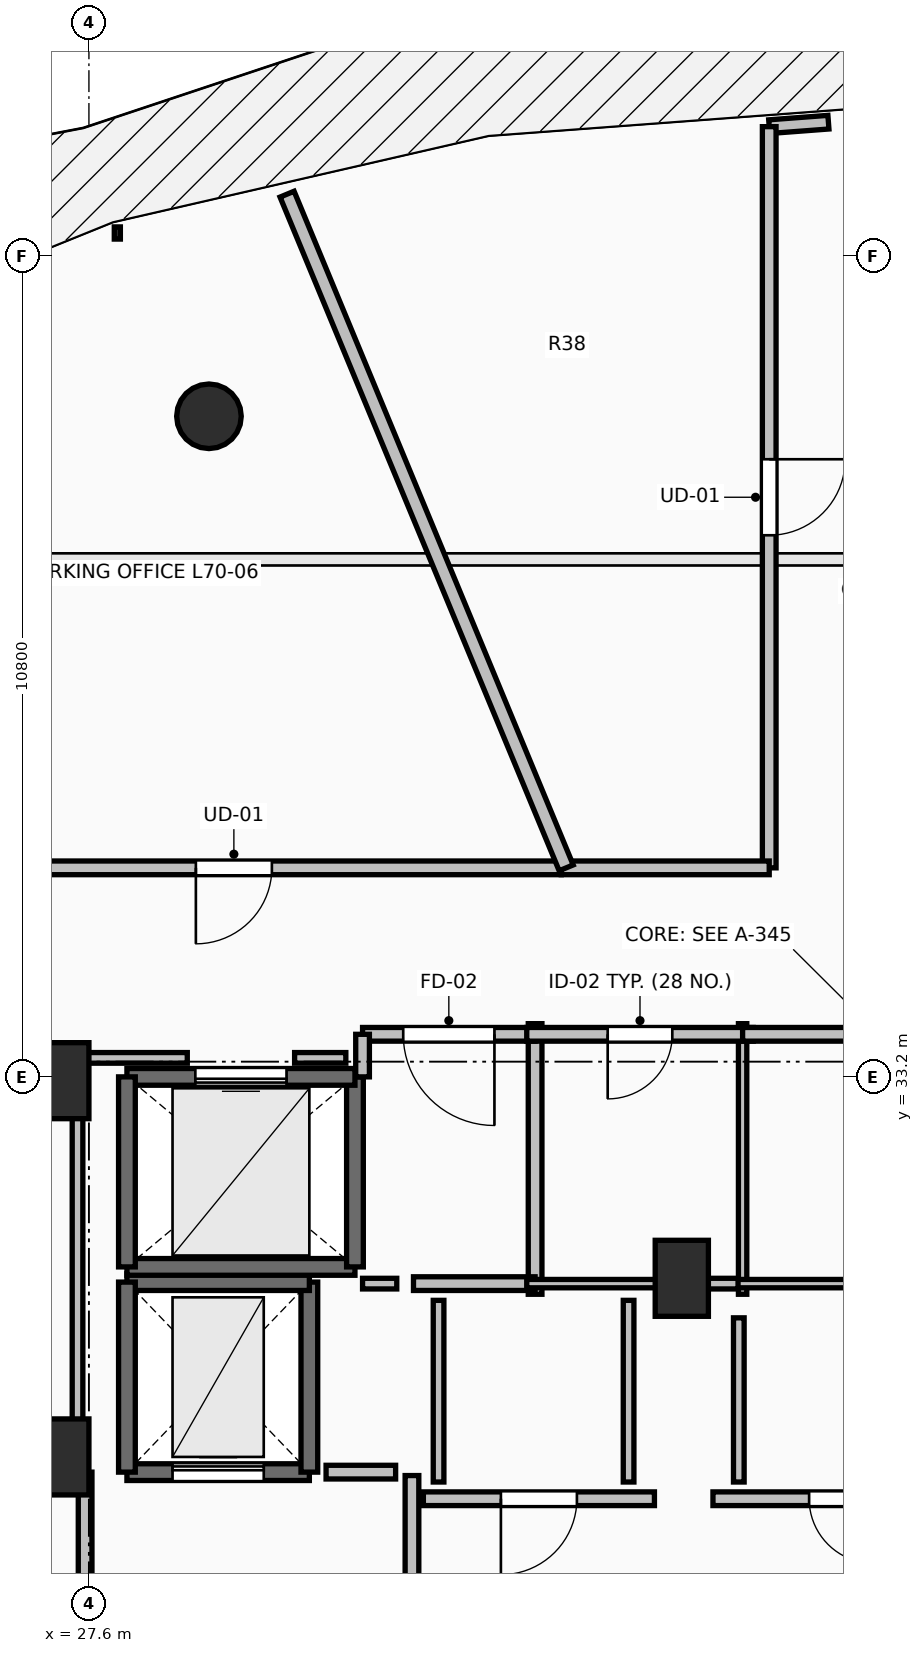
"""IFC4 building model, lengths in metres.
Left out: names, types, materials, properties, quantities, classifications, styles, units other than length and angle.
Written with IfcOpenShell. Run it as: python <this file> out.ifc"""

import sys

from ifc_helpers import new_model, si_unit, direction, frame, frame_2d, origin, origin_2d, place, context, subcontext, project, spatial, rectangle, circle, extrude, element, fill, save


model = new_model("IFC4")
c1 = context("Model", 3, precision=1e-05, world=origin(), true_north=direction((0.0, 1.0)))
c2 = subcontext(c1, "Body", "Model", "MODEL_VIEW")
j1 = project(units=[si_unit("LENGTHUNIT", "METRE"), si_unit("PLANEANGLEUNIT", "RADIAN")], contexts=[c1])
p1 = place(None, origin())
s1 = spatial("IfcSite", under=j1, at=p1, CompositionType="ELEMENT")
p2 = place(p1, origin())
s2 = spatial("IfcBuilding", under=s1, at=p2, CompositionType="ELEMENT")
p3 = place(p2, frame((0.0, 0.0, 259.1)))
s3 = spatial("IfcBuildingStorey", under=s2, at=p3, CompositionType="ELEMENT", Elevation=259.1)
p4 = place(p3, frame((29.179, 41.891, 0.0), z_axis=(0.0, 0.0, 1.0), x_axis=(-0.382683432365, 0.923879532511, 0.0)))
e1 = element("IfcColumn", 1, at=p4, inside=s3, PredefinedType="COLUMN", context=c2, shape_type="SweptSolid", body=[
    extrude(circle(Radius=0.425, at=origin_2d()), origin(), (0.0, 0.0, 1.0), 3.55),
])
for number, where, z_axis, x_axis in (
    (2, (27.25, 28.2, 0.0), (0.0, 0.0, 1.0), (1.0, 0.0, 0.0)),
    (3, (27.25, 33.15, 0.0), (0.0, 0.0, 1.0), (1.0, 0.0, 0.0)),
    (4, (35.4, 30.55, 0.0), (0.0, 0.0, 1.0), (1.0, 0.0, 0.0)),
):
    element("IfcColumn", number, at=place(p3, frame(where, z_axis=z_axis, x_axis=x_axis)), inside=s3, PredefinedType="PILASTER", context=c2, shape_type="SweptSolid", body=[
        extrude(rectangle(XDim=0.7, YDim=1.0, at=origin_2d()), origin(), (0.0, 0.0, 1.0), 3.55),
    ])
p5 = place(p3, frame((28.1, 28.0, 0.0), z_axis=(0.0, 0.0, 1.0), x_axis=(1.0, 0.0, 0.0)))
e5 = element("IfcWall", 5, at=p5, inside=s3, PredefinedType="SHEAR", context=c2, shape_type="SweptSolid", body=[
    extrude(rectangle(XDim=2.4, YDim=0.22, at=frame_2d((1.2, 0.0))), origin(), (0.0, 0.0, 1.0), 3.29),
])
p6 = place(p5, frame((0.6, 0.0, 0.0)))
e6 = element("IfcOpeningElement", 6, at=p6, cuts=e5, PredefinedType="OPENING", context=c2, shape_type="SweptSolid", body=[
    extrude(rectangle(XDim=1.2, YDim=2.2, at=frame_2d((0.6, 1.1))), frame((0.0, 0.125, 0.0), z_axis=(0.0, -1.0, 0.0), x_axis=(1.0, 0.0, 0.0)), (0.0, 0.0, 1.0), 0.25),
])
p7 = place(p3, frame((30.5, 28.0, 0.0), z_axis=(0.0, 0.0, 1.0), x_axis=(0.0, 1.0, 0.0)))
e7 = element("IfcWall", 7, at=p7, inside=s3, PredefinedType="SHEAR", context=c2, shape_type="SweptSolid", body=[
    extrude(rectangle(XDim=2.5, YDim=0.22, at=frame_2d((1.25, 0.0))), origin(), (0.0, 0.0, 1.0), 3.29),
])
p8 = place(p3, frame((30.5, 30.5, 0.0), z_axis=(0.0, 0.0, 1.0), x_axis=(-1.0, 0.0, 0.0)))
e8 = element("IfcWall", 8, at=p8, inside=s3, PredefinedType="SHEAR", context=c2, shape_type="SweptSolid", body=[
    extrude(rectangle(XDim=2.4, YDim=0.22, at=frame_2d((1.2, 0.0))), origin(), (0.0, 0.0, 1.0), 3.29),
])
p9 = place(p3, frame((28.1, 30.5, 0.0), z_axis=(0.0, 0.0, 1.0), x_axis=(0.0, -1.0, 0.0)))
e9 = element("IfcWall", 9, at=p9, inside=s3, PredefinedType="SHEAR", context=c2, shape_type="SweptSolid", body=[
    extrude(rectangle(XDim=2.5, YDim=0.22, at=frame_2d((1.25, 0.0))), origin(), (0.0, 0.0, 1.0), 3.29),
])
p10 = place(p3, frame((28.1, 30.7, 0.0), z_axis=(0.0, 0.0, 1.0), x_axis=(1.0, 0.0, 0.0)))
e10 = element("IfcWall", 10, at=p10, inside=s3, PredefinedType="SOLIDWALL", context=c2, shape_type="SweptSolid", body=[
    extrude(rectangle(XDim=3.0, YDim=0.22, at=frame_2d((1.5, 0.0))), origin(), (0.0, 0.0, 1.0), 3.29),
])
p11 = place(p3, frame((31.1, 30.7, 0.0), z_axis=(0.0, 0.0, 1.0), x_axis=(0.0, 1.0, 0.0)))
e11 = element("IfcWall", 11, at=p11, inside=s3, PredefinedType="SOLIDWALL", context=c2, shape_type="SweptSolid", body=[
    extrude(rectangle(XDim=2.5, YDim=0.22, at=frame_2d((1.25, 0.0))), origin(), (0.0, 0.0, 1.0), 3.29),
])
p12 = place(p3, frame((31.1, 33.2, 0.0), z_axis=(0.0, 0.0, 1.0), x_axis=(-1.0, 0.0, 0.0)))
e12 = element("IfcWall", 12, at=p12, inside=s3, PredefinedType="SOLIDWALL", context=c2, shape_type="SweptSolid", body=[
    extrude(rectangle(XDim=3.0, YDim=0.22, at=frame_2d((1.5, 0.0))), origin(), (0.0, 0.0, 1.0), 3.29),
])
p13 = place(p12, frame((0.9, 0.0, 0.0)))
e13 = element("IfcOpeningElement", 13, at=p13, cuts=e12, PredefinedType="OPENING", context=c2, shape_type="SweptSolid", body=[
    extrude(rectangle(XDim=1.2, YDim=2.2, at=frame_2d((0.6, 1.1))), frame((0.0, 0.125, 0.0), z_axis=(0.0, -1.0, 0.0), x_axis=(1.0, 0.0, 0.0)), (0.0, 0.0, 1.0), 0.25),
])
p14 = place(p3, frame((28.1, 33.2, 0.0), z_axis=(0.0, 0.0, 1.0), x_axis=(0.0, -1.0, 0.0)))
e14 = element("IfcWall", 14, at=p14, inside=s3, PredefinedType="SOLIDWALL", context=c2, shape_type="SweptSolid", body=[
    extrude(rectangle(XDim=2.5, YDim=0.22, at=frame_2d((1.25, 0.0))), origin(), (0.0, 0.0, 1.0), 3.29),
])
p15 = place(p3, frame((31.85, 24.045, 0.0), z_axis=(0.0, 0.0, 1.0), x_axis=(0.0, 1.0, 0.0)))
e15 = element("IfcWall", 15, at=p15, inside=s3, PredefinedType="PARTITIONING", context=c2, shape_type="SweptSolid", body=[
    extrude(rectangle(XDim=3.91, YDim=0.18, at=frame_2d((1.955, 0.0))), origin(), (0.0, 0.0, 1.0), 3.29),
])
p16 = place(p15, frame((1.355, 0.0, 0.0)))
e16 = element("IfcOpeningElement", 16, at=p16, cuts=e15, PredefinedType="OPENING", context=c2, shape_type="SweptSolid", body=[
    extrude(rectangle(XDim=1.2, YDim=2.15, at=frame_2d((0.6, 1.075))), frame((0.0, 0.105, 0.0), z_axis=(0.0, -1.0, 0.0), x_axis=(1.0, 0.0, 0.0)), (0.0, 0.0, 1.0), 0.21),
])
p17 = place(p3, frame((27.55, 28.0, 0.0), z_axis=(0.0, 0.0, 1.0), x_axis=(0.0, -1.0, 0.0)))
e17 = element("IfcWall", 17, at=p17, inside=s3, PredefinedType="PARTITIONING", context=c2, shape_type="SweptSolid", body=[
    extrude(rectangle(XDim=4.05, YDim=0.18, at=frame_2d((2.025, 0.0))), origin(), (0.0, 0.0, 1.0), 3.29),
])
p18 = place(p17, frame((1.425, 0.0, 0.0)))
e18 = element("IfcOpeningElement", 18, at=p18, cuts=e17, PredefinedType="OPENING", context=c2, shape_type="SweptSolid", body=[
    extrude(rectangle(XDim=1.2, YDim=2.15, at=frame_2d((0.6, 1.075))), frame((0.0, 0.105, 0.0), z_axis=(0.0, -1.0, 0.0), x_axis=(1.0, 0.0, 0.0)), (0.0, 0.0, 1.0), 0.21),
])
p19 = place(p3, frame((33.47, 30.34, 0.0), z_axis=(0.0, 0.0, 1.0), x_axis=(0.0, 1.0, 0.0)))
e19 = element("IfcWall", 19, at=p19, inside=s3, PredefinedType="PARTITIONING", context=c2, shape_type="SweptSolid", body=[
    extrude(rectangle(XDim=3.56, YDim=0.18, at=frame_2d((1.78, 0.0))), origin(), (0.0, 0.0, 1.0), 3.29),
])
p20 = place(p3, frame((31.87, 30.48, 0.0), z_axis=(0.0, 0.0, 1.0), x_axis=(1.0, 0.0, 0.0)))
e20 = element("IfcWall", 20, at=p20, inside=s3, PredefinedType="PARTITIONING", context=c2, shape_type="SweptSolid", body=[
    extrude(rectangle(XDim=1.6, YDim=0.18, at=frame_2d((0.8, 0.0))), origin(), (0.0, 0.0, 1.0), 3.29),
])
p21 = place(p3, frame((33.47, 33.76, 0.0), z_axis=(0.0, 0.0, 1.0), x_axis=(-1.0, 0.0, 0.0)))
e21 = element("IfcWall", 21, at=p21, inside=s3, PredefinedType="PARTITIONING", context=c2, shape_type="SweptSolid", body=[
    extrude(rectangle(XDim=2.27, YDim=0.18, at=frame_2d((1.135, 0.0))), origin(), (0.0, 0.0, 1.0), 3.29),
])
p22 = place(p21, frame((0.535, 0.0, 0.0)))
e22 = element("IfcOpeningElement", 22, at=p22, cuts=e21, PredefinedType="OPENING", context=c2, shape_type="SweptSolid", body=[
    extrude(rectangle(XDim=1.2, YDim=2.15, at=frame_2d((0.6, 1.075))), frame((0.0, 0.105, 0.0), z_axis=(0.0, -1.0, 0.0), x_axis=(1.0, 0.0, 0.0)), (0.0, 0.0, 1.0), 0.21),
])
p23 = place(p3, frame((31.2, 33.76, 0.0), z_axis=(0.0, 0.0, 1.0), x_axis=(0.0, -1.0, 0.0)))
e23 = element("IfcWall", 23, at=p23, inside=s3, PredefinedType="PARTITIONING", context=c2, shape_type="SweptSolid", body=[
    extrude(rectangle(XDim=0.56, YDim=0.18, at=frame_2d((0.28, 0.0))), origin(), (0.0, 0.0, 1.0), 3.29),
])
p24 = place(p3, frame((35.04, 27.65, 0.0), z_axis=(0.0, 0.0, 1.0), x_axis=(-1.0, 0.0, 0.0)))
e24 = element("IfcWall", 24, at=p24, inside=s3, PredefinedType="PARTITIONING", context=c2, shape_type="SweptSolid", body=[
    extrude(rectangle(XDim=3.04, YDim=0.18, at=frame_2d((1.52, 0.0))), origin(), (0.0, 0.0, 1.0), 3.29),
])
p25 = place(p24, frame((1.02, 0.0, 0.0)))
e25 = element("IfcOpeningElement", 25, at=p25, cuts=e24, PredefinedType="OPENING", context=c2, shape_type="SweptSolid", body=[
    extrude(rectangle(XDim=1.0, YDim=2.15, at=frame_2d((0.5, 1.075))), frame((0.0, 0.105, 0.0), z_axis=(0.0, -1.0, 0.0), x_axis=(1.0, 0.0, 0.0)), (0.0, 0.0, 1.0), 0.21),
])
p26 = place(p3, frame((39.19, 27.65, 0.0), z_axis=(0.0, 0.0, 1.0), x_axis=(-1.0, 0.0, 0.0)))
e26 = element("IfcWall", 26, at=p26, inside=s3, PredefinedType="PARTITIONING", context=c2, shape_type="SweptSolid", body=[
    extrude(rectangle(XDim=3.38, YDim=0.18, at=frame_2d((1.69, 0.0))), origin(), (0.0, 0.0, 1.0), 3.29),
])
p27 = place(p26, frame((1.265, 0.0, 0.0)))
e27 = element("IfcOpeningElement", 27, at=p27, cuts=e26, PredefinedType="OPENING", context=c2, shape_type="SweptSolid", body=[
    extrude(rectangle(XDim=0.85, YDim=2.1, at=frame_2d((0.425, 1.05))), frame((0.0, 0.105, 0.0), z_axis=(0.0, -1.0, 0.0), x_axis=(1.0, 0.0, 0.0)), (0.0, 0.0, 1.0), 0.21),
])
p28 = place(p3, frame((36.2, 30.34, 0.0), z_axis=(0.0, 0.0, 1.0), x_axis=(0.0, 1.0, 0.0)))
e28 = element("IfcWall", 28, at=p28, inside=s3, PredefinedType="PARTITIONING", context=c2, shape_type="SweptSolid", body=[
    extrude(rectangle(XDim=3.56, YDim=0.11, at=frame_2d((1.78, 0.0))), origin(), (0.0, 0.0, 1.0), 2.482),
])
p29 = place(p3, frame((33.36, 30.48, 0.0), z_axis=(0.0, 0.0, 1.0), x_axis=(1.0, 0.0, 0.0)))
e29 = element("IfcWall", 29, at=p29, inside=s3, PredefinedType="PARTITIONING", context=c2, shape_type="SweptSolid", body=[
    extrude(rectangle(XDim=1.81, YDim=0.11, at=frame_2d((0.905, 0.0))), origin(), (0.0, 0.0, 1.0), 3.29),
])
p30 = place(p3, frame((36.34, 33.76, 0.0), z_axis=(0.0, 0.0, 1.0), x_axis=(-1.0, 0.0, 0.0)))
e30 = element("IfcWall", 30, at=p30, inside=s3, PredefinedType="PARTITIONING", context=c2, shape_type="SweptSolid", body=[
    extrude(rectangle(XDim=2.98, YDim=0.18, at=frame_2d((1.49, 0.0))), origin(), (0.0, 0.0, 1.0), 3.29),
])
p31 = place(p30, frame((1.065, 0.0, 0.0)))
e31 = element("IfcOpeningElement", 31, at=p31, cuts=e30, PredefinedType="OPENING", context=c2, shape_type="SweptSolid", body=[
    extrude(rectangle(XDim=0.85, YDim=2.1, at=frame_2d((0.425, 1.05))), frame((0.0, 0.105, 0.0), z_axis=(0.0, -1.0, 0.0), x_axis=(1.0, 0.0, 0.0)), (0.0, 0.0, 1.0), 0.21),
])
p32 = place(p3, frame((36.11, 30.48, 0.0), z_axis=(0.0, 0.0, 1.0), x_axis=(1.0, 0.0, 0.0)))
e32 = element("IfcWall", 32, at=p32, inside=s3, PredefinedType="PARTITIONING", context=c2, shape_type="SweptSolid", body=[
    extrude(rectangle(XDim=3.21, YDim=0.11, at=frame_2d((1.605, 0.0))), origin(), (0.0, 0.0, 1.0), 2.482),
])
p33 = place(p3, frame((41.04, 33.76, 0.0), z_axis=(0.0, 0.0, 1.0), x_axis=(-1.0, 0.0, 0.0)))
e33 = element("IfcWall", 33, at=p33, inside=s3, PredefinedType="PARTITIONING", context=c2, shape_type="SweptSolid", body=[
    extrude(rectangle(XDim=4.84, YDim=0.18, at=frame_2d((2.42, 0.0))), origin(), (0.0, 0.0, 1.0), 3.29),
])
p34 = place(p33, frame((1.995, 0.0, 0.0)))
e34 = element("IfcOpeningElement", 34, at=p34, cuts=e33, PredefinedType="OPENING", context=c2, shape_type="SweptSolid", body=[
    extrude(rectangle(XDim=0.85, YDim=2.1, at=frame_2d((0.425, 1.05))), frame((0.0, 0.105, 0.0), z_axis=(0.0, -1.0, 0.0), x_axis=(1.0, 0.0, 0.0)), (0.0, 0.0, 1.0), 0.21),
])
p35 = place(p3, frame((37.329, 45.76, 0.0), z_axis=(0.0, 0.0, 1.0), x_axis=(-0.997136622012, -0.0756211415, 0.0)))
e35 = element("IfcWall", 35, at=p35, inside=s3, PredefinedType="PARTITIONING", context=c2, shape_type="SweptSolid", body=[
    extrude(rectangle(XDim=0.781, YDim=0.18, at=frame_2d((0.391, 0.0))), origin(), (0.0, 0.0, 1.0), 3.29),
])
p36 = place(p3, frame((36.55, 45.701, 0.0), z_axis=(0.0, 0.0, 1.0), x_axis=(0.0, -1.0, 0.0)))
e36 = element("IfcWall", 36, at=p36, inside=s3, PredefinedType="PARTITIONING", context=c2, shape_type="SweptSolid", body=[
    extrude(rectangle(XDim=9.751, YDim=0.18, at=frame_2d((4.875, 0.0))), origin(), (0.0, 0.0, 1.0), 2.482),
])
p37 = place(p36, frame((4.375, 0.0, 0.0)))
e37 = element("IfcOpeningElement", 37, at=p37, cuts=e36, PredefinedType="OPENING", context=c2, shape_type="SweptSolid", body=[
    extrude(rectangle(XDim=1.0, YDim=2.15, at=frame_2d((0.5, 1.075))), frame((0.0, 0.105, 0.0), z_axis=(0.0, -1.0, 0.0), x_axis=(1.0, 0.0, 0.0)), (0.0, 0.0, 1.0), 0.21),
])
p38 = place(p3, frame((36.55, 35.95, 0.0), z_axis=(0.0, 0.0, 1.0), x_axis=(-1.0, 0.0, 0.0)))
e38 = element("IfcWall", 38, at=p38, inside=s3, PredefinedType="PARTITIONING", context=c2, shape_type="SweptSolid", body=[
    extrude(rectangle(XDim=2.736, YDim=0.18, at=frame_2d((1.368, 0.0))), origin(), (0.0, 0.0, 1.0), 3.29),
])
p39 = place(p3, frame((33.814, 35.95, 0.0), z_axis=(0.0, 0.0, 1.0), x_axis=(-1.0, 0.0, 0.0)))
e39 = element("IfcWall", 39, at=p39, inside=s3, PredefinedType="PARTITIONING", context=c2, shape_type="SweptSolid", body=[
    extrude(rectangle(XDim=8.614, YDim=0.18, at=frame_2d((4.307, 0.0))), origin(), (0.0, 0.0, 1.0), 2.482),
])
p40 = place(p39, frame((3.807, 0.0, 0.0)))
e40 = element("IfcOpeningElement", 40, at=p40, cuts=e39, PredefinedType="OPENING", context=c2, shape_type="SweptSolid", body=[
    extrude(rectangle(XDim=1.0, YDim=2.15, at=frame_2d((0.5, 1.075))), frame((0.0, 0.105, 0.0), z_axis=(0.0, -1.0, 0.0), x_axis=(1.0, 0.0, 0.0)), (0.0, 0.0, 1.0), 0.21),
])
p41 = place(p3, frame((30.207, 44.813, 0.0), z_axis=(0.0, 0.0, 1.0), x_axis=(0.38274436158, -0.92385429245, 0.0)))
e41 = element("IfcWall", 41, at=p41, inside=s3, PredefinedType="PARTITIONING", context=c2, shape_type="SweptSolid", body=[
    extrude(rectangle(XDim=9.594, YDim=0.2, at=frame_2d((4.797, 0.0))), origin(), (0.0, 0.0, 1.0), 2.482),
])
p42 = place(p3, frame((31.635, 28.0, 0.0), z_axis=(0.0, 0.0, 1.0), x_axis=(-1.0, 0.0, 0.0)))
e42 = element("IfcWall", 42, at=p42, inside=s3, PredefinedType="PARTITIONING", context=c2, shape_type="SweptSolid", body=[
    extrude(rectangle(XDim=0.915, YDim=0.18, at=frame_2d((0.458, 0.0))), origin(), (0.0, 0.0, 1.0), 3.29),
])
p43 = place(p3, frame((31.2, 30.48, 0.0), z_axis=(0.0, 0.0, 1.0), x_axis=(1.0, 0.0, 0.0)))
e43 = element("IfcWall", 43, at=p43, inside=s3, PredefinedType="PARTITIONING", context=c2, shape_type="SweptSolid", body=[
    extrude(rectangle(XDim=0.45, YDim=0.14, at=frame_2d((0.225, 0.0))), origin(), (0.0, 0.0, 1.0), 3.29),
])
p44 = place(p3, frame((35.14, 30.48, 0.0), z_axis=(0.0, 0.0, 1.0), x_axis=(1.0, 0.0, 0.0)))
e44 = element("IfcWall", 44, at=p44, inside=s3, PredefinedType="PARTITIONING", context=c2, shape_type="SweptSolid", body=[
    extrude(rectangle(XDim=1.0, YDim=0.14, at=frame_2d((0.5, 0.0))), origin(), (0.0, 0.0, 1.0), 2.482),
])
for number, where, z_axis, x_axis in (
    (45, (32.2, 30.26, 0.0), (0.0, 0.0, 1.0), (0.0, -1.0, 0.0)),
    (46, (34.7, 27.87, 0.0), (0.0, 0.0, 1.0), (0.0, 1.0, 0.0)),
):
    element("IfcWall", number, at=place(p3, frame(where, z_axis=z_axis, x_axis=x_axis)), inside=s3, PredefinedType="PARTITIONING", context=c2, shape_type="SweptSolid", body=[
        extrude(rectangle(XDim=2.39, YDim=0.14, at=frame_2d((1.195, 0.0))), origin(), (0.0, 0.0, 1.0), 3.29),
    ])
p45 = place(p3, frame((36.15, 30.03, 0.0), z_axis=(0.0, 0.0, 1.0), x_axis=(0.0, -1.0, 0.0)))
e47 = element("IfcWall", 47, at=p45, inside=s3, PredefinedType="PARTITIONING", context=c2, shape_type="SweptSolid", body=[
    extrude(rectangle(XDim=2.16, YDim=0.14, at=frame_2d((1.08, 0.0))), origin(), (0.0, 0.0, 1.0), 3.29),
])
p46 = place(p3, frame((30.98, 33.45, 0.0), z_axis=(0.0, 0.0, 1.0), x_axis=(-1.0, 0.0, 0.0)))
e48 = element("IfcWall", 48, at=p46, inside=s3, PredefinedType="PARTITIONING", context=c2, shape_type="SweptSolid", body=[
    extrude(rectangle(XDim=0.674, YDim=0.14, at=frame_2d((0.337, 0.0))), origin(), (0.0, 0.0, 1.0), 3.29),
])
p47 = place(p3, frame((28.894, 33.45, 0.0), z_axis=(0.0, 0.0, 1.0), x_axis=(-1.0, 0.0, 0.0)))
e49 = element("IfcWall", 49, at=p47, inside=s3, PredefinedType="PARTITIONING", context=c2, shape_type="SweptSolid", body=[
    extrude(rectangle(XDim=1.444, YDim=0.14, at=frame_2d((0.722, 0.0))), origin(), (0.0, 0.0, 1.0), 2.482),
])
p48 = place(p3, frame((27.45, 33.45, 0.0), z_axis=(0.0, 0.0, 1.0), x_axis=(0.0, -1.0, 0.0)))
e50 = element("IfcWall", 50, at=p48, inside=s3, PredefinedType="PARTITIONING", context=c2, shape_type="SweptSolid", body=[
    extrude(rectangle(XDim=5.254, YDim=0.14, at=frame_2d((2.627, 0.0))), origin(), (0.0, 0.0, 1.0), 2.482),
])
p49 = place(p6, origin())
e51 = element("IfcDoor", 51, at=p49, inside=s3, OperationType="SLIDING_TO_LEFT", PredefinedType="DOOR", context=c2, shape_type="SweptSolid", body=[
    extrude(rectangle(XDim=1.2, YDim=2.2, at=frame_2d((0.6, 1.1))), frame((0.0, 0.025, 0.0), z_axis=(0.0, -1.0, 0.0), x_axis=(1.0, 0.0, 0.0)), (0.0, 0.0, 1.0), 0.05),
])
fill(e6, e51)
p50 = place(p13, origin())
e52 = element("IfcDoor", 52, at=p50, inside=s3, OperationType="SLIDING_TO_LEFT", PredefinedType="DOOR", context=c2, shape_type="SweptSolid", body=[
    extrude(rectangle(XDim=1.2, YDim=2.2, at=frame_2d((0.6, 1.1))), frame((0.0, 0.025, 0.0), z_axis=(0.0, -1.0, 0.0), x_axis=(1.0, 0.0, 0.0)), (0.0, 0.0, 1.0), 0.05),
])
fill(e13, e52)
p51 = place(p22, origin())
e53 = element("IfcDoor", 53, at=p51, inside=s3, OperationType="SINGLE_SWING_LEFT", PredefinedType="DOOR", context=c2, shape_type="SweptSolid", body=[
    extrude(rectangle(XDim=1.2, YDim=2.15, at=frame_2d((0.6, 1.075))), frame((0.0, 0.025, 0.0), z_axis=(0.0, -1.0, 0.0), x_axis=(1.0, 0.0, 0.0)), (0.0, 0.0, 1.0), 0.05),
])
fill(e22, e53)
p52 = place(p25, origin())
e54 = element("IfcDoor", 54, at=p52, inside=s3, OperationType="SINGLE_SWING_RIGHT", PredefinedType="DOOR", context=c2, shape_type="SweptSolid", body=[
    extrude(rectangle(XDim=1.0, YDim=2.15, at=frame_2d((0.5, 1.075))), frame((0.0, 0.025, 0.0), z_axis=(0.0, -1.0, 0.0), x_axis=(1.0, 0.0, 0.0)), (0.0, 0.0, 1.0), 0.05),
])
fill(e25, e54)
p53 = place(p27, origin())
e55 = element("IfcDoor", 55, at=p53, inside=s3, OperationType="SINGLE_SWING_LEFT", PredefinedType="DOOR", context=c2, shape_type="SweptSolid", body=[
    extrude(rectangle(XDim=0.85, YDim=2.1, at=frame_2d((0.425, 1.05))), frame((0.0, 0.025, 0.0), z_axis=(0.0, -1.0, 0.0), x_axis=(1.0, 0.0, 0.0)), (0.0, 0.0, 1.0), 0.05),
])
fill(e27, e55)
p54 = place(p31, origin())
e56 = element("IfcDoor", 56, at=p54, inside=s3, OperationType="SINGLE_SWING_RIGHT", PredefinedType="DOOR", context=c2, shape_type="SweptSolid", body=[
    extrude(rectangle(XDim=0.85, YDim=2.1, at=frame_2d((0.425, 1.05))), frame((0.0, 0.025, 0.0), z_axis=(0.0, -1.0, 0.0), x_axis=(1.0, 0.0, 0.0)), (0.0, 0.0, 1.0), 0.05),
])
fill(e31, e56)
p55 = place(p37, origin())
e57 = element("IfcDoor", 57, at=p55, inside=s3, OperationType="SINGLE_SWING_LEFT", PredefinedType="DOOR", context=c2, shape_type="SweptSolid", body=[
    extrude(rectangle(XDim=1.0, YDim=2.15, at=frame_2d((0.5, 1.075))), frame((0.0, 0.025, 0.0), z_axis=(0.0, -1.0, 0.0), x_axis=(1.0, 0.0, 0.0)), (0.0, 0.0, 1.0), 0.05),
])
fill(e37, e57)
p56 = place(p40, origin())
e58 = element("IfcDoor", 58, at=p56, inside=s3, OperationType="SINGLE_SWING_RIGHT", PredefinedType="DOOR", context=c2, shape_type="SweptSolid", body=[
    extrude(rectangle(XDim=1.0, YDim=2.15, at=frame_2d((0.5, 1.075))), frame((0.0, 0.025, 0.0), z_axis=(0.0, -1.0, 0.0), x_axis=(1.0, 0.0, 0.0)), (0.0, 0.0, 1.0), 0.05),
])
fill(e40, e58)
save(model, sys.argv[1])
